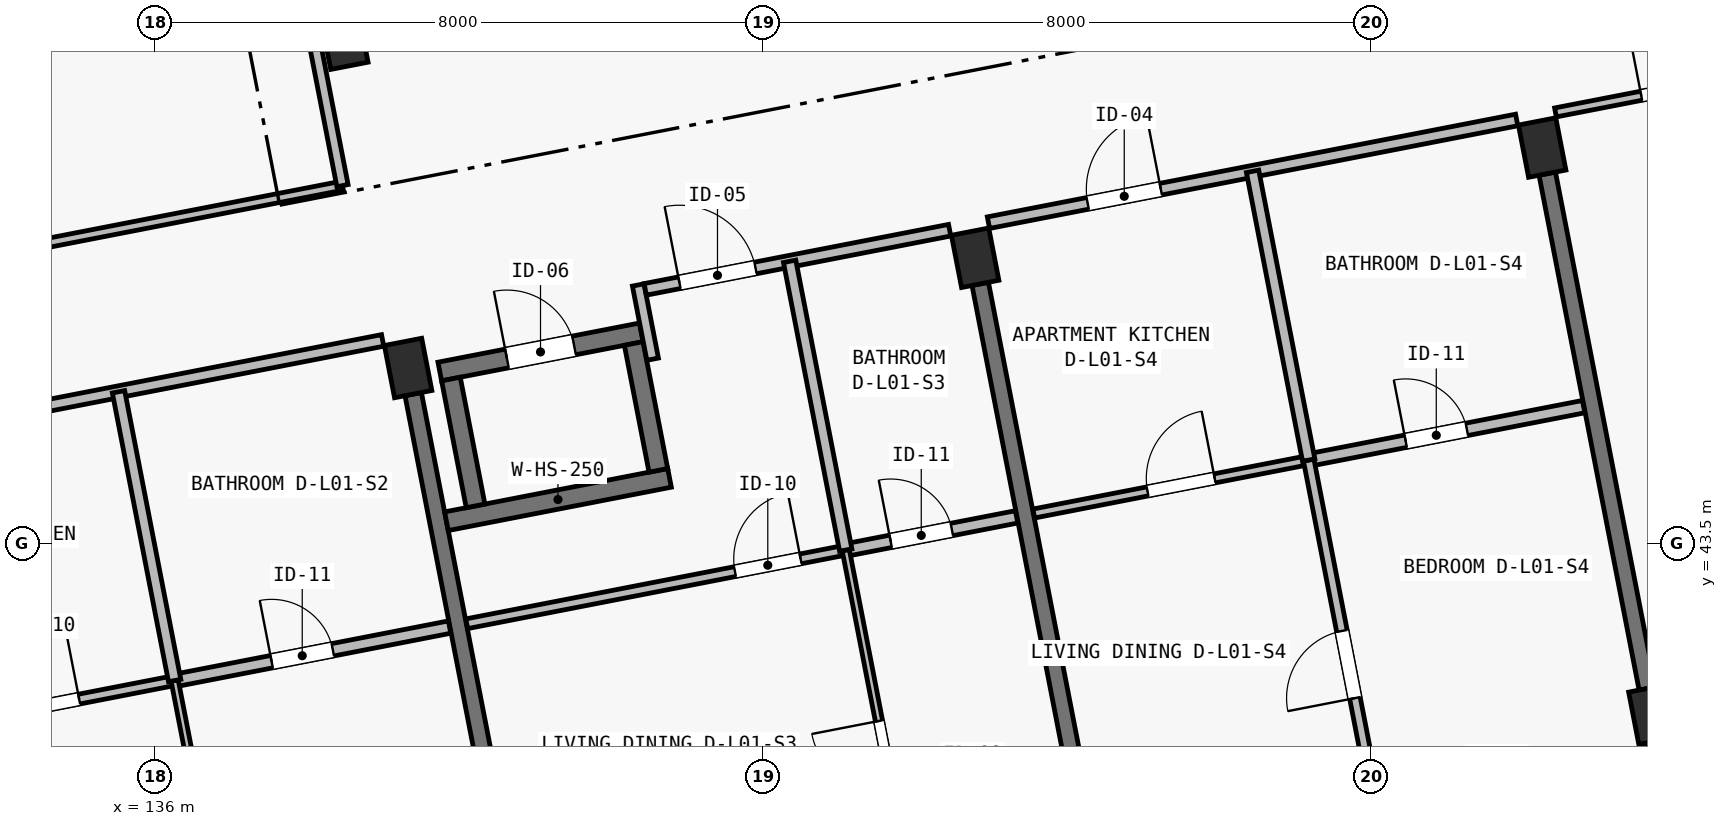
"""IFC4 building model, lengths in metres.
Left out: names, types, materials, properties, quantities, classifications, styles, units other than length and angle.
Written with IfcOpenShell. Run it as: python <this file> out.ifc"""

import sys

from ifc_helpers import new_model, si_unit, direction, frame, frame_2d, origin, origin_2d, place, context, subcontext, project, spatial, rectangle, extrude, element, fill, save


model = new_model("IFC4")
c1 = context("Model", 3, precision=1e-05, world=origin(), true_north=direction((0.0, 1.0)))
c2 = subcontext(c1, "Body", "Model", "MODEL_VIEW")
j1 = project(units=[si_unit("LENGTHUNIT", "METRE"), si_unit("PLANEANGLEUNIT", "RADIAN")], contexts=[c1])
p1 = place(None, origin())
s1 = spatial("IfcSite", under=j1, at=p1, CompositionType="ELEMENT")
p2 = place(p1, origin())
s2 = spatial("IfcBuilding", under=s1, at=p2, CompositionType="ELEMENT")
p3 = place(p2, frame((0.0, 0.0, 4.5)))
s3 = spatial("IfcBuildingStorey", under=s2, at=p3, CompositionType="ELEMENT", Elevation=4.5)
for number, where, z_axis, x_axis in (
    (1, (139.331, 45.811, 0.0), (0.0, 0.0, 1.0), (0.982, 0.191, 0.0)),
    (2, (138.491, 50.13, 0.0), (0.0, 0.0, 1.0), (0.982, 0.191, 0.0)),
    (3, (146.791, 47.261, 0.0), (0.0, 0.0, 1.0), (0.982, 0.191, 0.0)),
    (4, (155.702, 41.251, 0.0), (0.0, 0.0, 1.0), (0.982, 0.191, 0.0)),
    (5, (154.252, 48.711, 0.0), (0.0, 0.0, 1.0), (0.982, 0.191, 0.0)),
):
    element("IfcColumn", number, at=place(p3, frame(where, z_axis=z_axis, x_axis=x_axis)), inside=s3, PredefinedType="COLUMN", context=c2, shape_type="SweptSolid", body=[
        extrude(rectangle(XDim=0.5, YDim=0.7, at=origin_2d()), origin(), (0.0, 0.0, 1.0), 3.9),
    ])
p4 = place(p3, frame((140.714, 38.694, -0.25), z_axis=(0.0, 0.0, 1.0), x_axis=(-0.190819465253, 0.981625148252, 0.0)))
e6 = element("IfcWall", 6, at=p4, inside=s3, PredefinedType="SHEAR", context=c2, shape_type="SweptSolid", body=[
    extrude(rectangle(XDim=6.9, YDim=0.22, at=frame_2d((3.45, 0.0))), origin(), (0.0, 0.0, 1.0), 3.4),
])
p5 = place(p3, frame((148.175, 40.144, -0.25), z_axis=(0.0, 0.0, 1.0), x_axis=(-0.190812837813, 0.981626436546, 0.0)))
e7 = element("IfcWall", 7, at=p5, inside=s3, PredefinedType="SHEAR", context=c2, shape_type="SweptSolid", body=[
    extrude(rectangle(XDim=6.9, YDim=0.22, at=frame_2d((3.45, 0.0))), origin(), (0.0, 0.0, 1.0), 3.4),
])
p6 = place(p3, frame((155.635, 41.594, -0.25), z_axis=(0.0, 0.0, 1.0), x_axis=(-0.190819465253, 0.981625148252, 0.0)))
e8 = element("IfcWall", 8, at=p6, inside=s3, PredefinedType="SHEAR", context=c2, shape_type="SweptSolid", body=[
    extrude(rectangle(XDim=6.9, YDim=0.22, at=frame_2d((3.45, 0.0))), origin(), (0.0, 0.0, 1.0), 3.4),
])
p7 = place(p3, frame((139.835, 43.795, 0.0), z_axis=(0.0, 0.0, 1.0), x_axis=(0.981624737535, 0.190821578075, 0.0)))
e9 = element("IfcWall", 9, at=p7, inside=s3, PredefinedType="SHEAR", context=c2, shape_type="SweptSolid", body=[
    extrude(rectangle(XDim=2.99, YDim=0.25, at=frame_2d((1.495, 0.0))), origin(), (0.0, 0.0, 1.0), 3.9),
])
p8 = place(p3, frame((139.748, 45.764, 0.0), z_axis=(0.0, 0.0, 1.0), x_axis=(0.981630445883, 0.190792210834, 0.0)))
e10 = element("IfcWall", 10, at=p8, inside=s3, PredefinedType="SHEAR", context=c2, shape_type="SweptSolid", body=[
    extrude(rectangle(XDim=2.7, YDim=0.25, at=frame_2d((1.35, 0.0))), origin(), (0.0, 0.0, 1.0), 3.9),
])
p9 = place(p8, frame((0.9, 0.0, 0.0)))
e11 = element("IfcOpeningElement", 11, at=p9, cuts=e10, PredefinedType="OPENING", context=c2, shape_type="SweptSolid", body=[
    extrude(rectangle(XDim=0.9, YDim=2.05, at=frame_2d((0.45, 1.025))), frame((0.0, 0.14, 0.0), z_axis=(0.0, -1.0, 0.0), x_axis=(1.0, 0.0, 0.0)), (0.0, 0.0, 1.0), 0.28),
])
for number, where, z_axis, x_axis in (
    (12, (140.218, 43.997, 0.0), (0.0, 0.0, 1.0), (-0.191, 0.982, 0.0)),
    (13, (142.623, 44.464, 0.0), (0.0, 0.0, 1.0), (-0.191, 0.982, 0.0)),
):
    element("IfcWall", number, at=place(p3, frame(where, z_axis=z_axis, x_axis=x_axis)), inside=s3, PredefinedType="SHEAR", context=c2, shape_type="SweptSolid", body=[
        extrude(rectangle(XDim=1.7, YDim=0.25, at=frame_2d((0.85, 0.0))), origin(), (0.0, 0.0, 1.0), 3.9),
    ])
p10 = place(p3, frame((155.802, 40.735, 0.0), z_axis=(0.0, 0.0, 1.0), x_axis=(-0.981626422232, -0.190812911449, 0.0)))
e14 = element("IfcWall", 14, at=p10, inside=s3, PredefinedType="SOLIDWALL", context=c2, shape_type="SweptSolid", body=[
    extrude(rectangle(XDim=7.6, YDim=0.24, at=frame_2d((3.8, 0.0))), origin(), (0.0, 0.0, 1.0), 3.65),
])
p11 = place(p10, frame((1.847, 0.0, 0.52)))
e15 = element("IfcOpeningElement", 15, at=p11, cuts=e14, PredefinedType="OPENING", context=c2, shape_type="SweptSolid", body=[
    extrude(rectangle(XDim=0.68, YDim=2.24, at=frame_2d((0.34, 1.12))), frame((0.0, 0.135, 0.0), z_axis=(0.0, -1.0, 0.0), x_axis=(1.0, 0.0, 0.0)), (0.0, 0.0, 1.0), 0.27),
])
p12 = place(p10, frame((5.062, 0.0, 0.52)))
e16 = element("IfcOpeningElement", 16, at=p12, cuts=e14, PredefinedType="OPENING", context=c2, shape_type="SweptSolid", body=[
    extrude(rectangle(XDim=0.74, YDim=2.26, at=frame_2d((0.37, 1.13))), frame((0.0, 0.135, 0.0), z_axis=(0.0, -1.0, 0.0), x_axis=(1.0, 0.0, 0.0)), (0.0, 0.0, 1.0), 0.27),
])
p13 = place(p3, frame((132.046, 44.823, 0.0), z_axis=(0.0, 0.0, 1.0), x_axis=(0.9816234647, 0.190828125677, 0.0)))
e17 = element("IfcWall", 17, at=p13, inside=s3, PredefinedType="PARTITIONING", context=c2, shape_type="SweptSolid", body=[
    extrude(rectangle(XDim=7.08, YDim=0.155, at=frame_2d((3.54, 0.0))), origin(), (0.0, 0.0, 1.0), 3.62),
])
p14 = place(p13, frame((1.33, 0.0, 0.0)))
e18 = element("IfcOpeningElement", 18, at=p14, cuts=e17, PredefinedType="OPENING", context=c2, shape_type="SweptSolid", body=[
    extrude(rectangle(XDim=1.02, YDim=2.2, at=frame_2d((0.51, 1.1))), frame((0.0, 0.093, 0.0), z_axis=(0.0, -1.0, 0.0), x_axis=(1.0, 0.0, 0.0)), (0.0, 0.0, 1.0), 0.185),
])
p15 = place(p3, frame((132.642, 40.996, 0.0), z_axis=(0.0, 0.0, 1.0), x_axis=(0.981626422232, 0.190812911449, 0.0)))
e19 = element("IfcWall", 19, at=p15, inside=s3, PredefinedType="PARTITIONING", context=c2, shape_type="SweptSolid", body=[
    extrude(rectangle(XDim=3.685, YDim=0.13, at=frame_2d((1.842, 0.0))), origin(), (0.0, 0.0, 1.0), 3.62),
])
p16 = place(p15, frame((1.525, 0.0, 0.0)))
e20 = element("IfcOpeningElement", 20, at=p16, cuts=e19, PredefinedType="OPENING", context=c2, shape_type="SweptSolid", body=[
    extrude(rectangle(XDim=0.88, YDim=2.1, at=frame_2d((0.44, 1.05))), frame((0.0, 0.08, 0.0), z_axis=(0.0, -1.0, 0.0), x_axis=(1.0, 0.0, 0.0)), (0.0, 0.0, 1.0), 0.16),
])
p17 = place(p3, frame((136.259, 41.699, 0.0), z_axis=(0.0, 0.0, 1.0), x_axis=(0.981628834294, 0.190800502313, 0.0)))
e21 = element("IfcWall", 21, at=p17, inside=s3, PredefinedType="PLUMBINGWALL", context=c2, shape_type="SweptSolid", body=[
    extrude(rectangle(XDim=3.685, YDim=0.165, at=frame_2d((1.843, 0.0))), origin(), (0.0, 0.0, 1.0), 3.62),
])
p18 = place(p17, frame((1.3, 0.0, 0.0)))
e22 = element("IfcOpeningElement", 22, at=p18, cuts=e21, PredefinedType="OPENING", context=c2, shape_type="SweptSolid", body=[
    extrude(rectangle(XDim=0.82, YDim=2.08, at=frame_2d((0.41, 1.04))), frame((0.0, 0.097, 0.0), z_axis=(0.0, -1.0, 0.0), x_axis=(1.0, 0.0, 0.0)), (0.0, 0.0, 1.0), 0.195),
])
p19 = place(p3, frame((137.125, 37.242, 0.0), z_axis=(0.0, 0.0, 1.0), x_axis=(-0.190787619192, 0.981631338316, 0.0)))
e23 = element("IfcWall", 23, at=p19, inside=s3, PredefinedType="PARTITIONING", context=c2, shape_type="SweptSolid", body=[
    extrude(rectangle(XDim=4.54, YDim=0.095, at=frame_2d((2.27, 0.0))), origin(), (0.0, 0.0, 1.0), 3.62),
])
p20 = place(p19, frame((1.35, 0.0, 0.0)))
e24 = element("IfcOpeningElement", 24, at=p20, cuts=e23, PredefinedType="OPENING", context=c2, shape_type="SweptSolid", body=[
    extrude(rectangle(XDim=0.9, YDim=2.1, at=frame_2d((0.45, 1.05))), frame((0.0, 0.062, 0.0), z_axis=(0.0, -1.0, 0.0), x_axis=(1.0, 0.0, 0.0)), (0.0, 0.0, 1.0), 0.125),
])
p21 = place(p3, frame((136.259, 41.699, 0.0), z_axis=(0.0, 0.0, 1.0), x_axis=(-0.190835887914, 0.981621955686, 0.0)))
e25 = element("IfcWall", 25, at=p21, inside=s3, PredefinedType="PLUMBINGWALL", context=c2, shape_type="SweptSolid", body=[
    extrude(rectangle(XDim=3.87, YDim=0.165, at=frame_2d((1.935, 0.0))), origin(), (0.0, 0.0, 1.0), 3.62),
])
p22 = place(p3, frame((142.548, 45.927, 0.0), z_axis=(0.0, 0.0, 1.0), x_axis=(-0.190639805817, 0.981660055436, 0.0)))
e26 = element("IfcWall", 26, at=p22, inside=s3, PredefinedType="PARTITIONING", context=c2, shape_type="SweptSolid", body=[
    extrude(rectangle(XDim=0.995, YDim=0.155, at=frame_2d((0.498, 0.0))), origin(), (0.0, 0.0, 1.0), 3.62),
])
p23 = place(p3, frame((142.451, 46.845, 0.0), z_axis=(0.0, 0.0, 1.0), x_axis=(0.981636249117, 0.190762350636, 0.0)))
e27 = element("IfcWall", 27, at=p23, inside=s3, PredefinedType="PARTITIONING", context=c2, shape_type="SweptSolid", body=[
    extrude(rectangle(XDim=4.08, YDim=0.155, at=frame_2d((2.04, 0.0))), origin(), (0.0, 0.0, 1.0), 3.62),
])
p24 = place(p23, frame((0.458, 0.0, 0.0)))
e28 = element("IfcOpeningElement", 28, at=p24, cuts=e27, PredefinedType="OPENING", context=c2, shape_type="SweptSolid", body=[
    extrude(rectangle(XDim=1.02, YDim=2.2, at=frame_2d((0.51, 1.1))), frame((0.0, 0.093, 0.0), z_axis=(0.0, -1.0, 0.0), x_axis=(1.0, 0.0, 0.0)), (0.0, 0.0, 1.0), 0.185),
])
p25 = place(p3, frame((140.102, 42.446, 0.0), z_axis=(0.0, 0.0, 1.0), x_axis=(0.981621892043, 0.19083621528, 0.0)))
e29 = element("IfcWall", 29, at=p25, inside=s3, PredefinedType="PARTITIONING", context=c2, shape_type="SweptSolid", body=[
    extrude(rectangle(XDim=5.08, YDim=0.13, at=frame_2d((2.54, 0.0))), origin(), (0.0, 0.0, 1.0), 3.62),
])
p26 = place(p25, frame((3.595, 0.0, 0.0)))
e30 = element("IfcOpeningElement", 30, at=p26, cuts=e29, PredefinedType="OPENING", context=c2, shape_type="SweptSolid", body=[
    extrude(rectangle(XDim=0.88, YDim=2.1, at=frame_2d((0.44, 1.05))), frame((0.0, 0.08, 0.0), z_axis=(0.0, -1.0, 0.0), x_axis=(1.0, 0.0, 0.0)), (0.0, 0.0, 1.0), 0.16),
])
p27 = place(p3, frame((145.089, 43.416, 0.0), z_axis=(0.0, 0.0, 1.0), x_axis=(0.981640351498, 0.190741239147, 0.0)))
e31 = element("IfcWall", 31, at=p27, inside=s3, PredefinedType="PLUMBINGWALL", context=c2, shape_type="SweptSolid", body=[
    extrude(rectangle(XDim=2.29, YDim=0.165, at=frame_2d((1.145, 0.0))), origin(), (0.0, 0.0, 1.0), 3.62),
])
p28 = place(p27, frame((0.602, 0.0, 0.0)))
e32 = element("IfcOpeningElement", 32, at=p28, cuts=e31, PredefinedType="OPENING", context=c2, shape_type="SweptSolid", body=[
    extrude(rectangle(XDim=0.82, YDim=2.08, at=frame_2d((0.41, 1.04))), frame((0.0, 0.097, 0.0), z_axis=(0.0, -1.0, 0.0), x_axis=(1.0, 0.0, 0.0)), (0.0, 0.0, 1.0), 0.195),
])
p29 = place(p3, frame((145.955, 38.959, 0.0), z_axis=(0.0, 0.0, 1.0), x_axis=(-0.190797690541, 0.981629380817, 0.0)))
e33 = element("IfcWall", 33, at=p29, inside=s3, PredefinedType="PARTITIONING", context=c2, shape_type="SweptSolid", body=[
    extrude(rectangle(XDim=4.54, YDim=0.095, at=frame_2d((2.27, 0.0))), origin(), (0.0, 0.0, 1.0), 3.62),
])
p30 = place(p29, frame((1.35, 0.0, 0.0)))
e34 = element("IfcOpeningElement", 34, at=p30, cuts=e33, PredefinedType="OPENING", context=c2, shape_type="SweptSolid", body=[
    extrude(rectangle(XDim=0.9, YDim=2.1, at=frame_2d((0.45, 1.05))), frame((0.0, 0.062, 0.0), z_axis=(0.0, -1.0, 0.0), x_axis=(1.0, 0.0, 0.0)), (0.0, 0.0, 1.0), 0.125),
])
p31 = place(p3, frame((145.089, 43.416, 0.0), z_axis=(0.0, 0.0, 1.0), x_axis=(-0.190835887914, 0.981621955686, 0.0)))
e35 = element("IfcWall", 35, at=p31, inside=s3, PredefinedType="PLUMBINGWALL", context=c2, shape_type="SweptSolid", body=[
    extrude(rectangle(XDim=3.87, YDim=0.165, at=frame_2d((1.935, 0.0))), origin(), (0.0, 0.0, 1.0), 3.62),
])
p32 = place(p3, frame((146.966, 47.723, 0.0), z_axis=(0.0, 0.0, 1.0), x_axis=(0.981629923556, 0.190794898199, 0.0)))
e36 = element("IfcWall", 36, at=p32, inside=s3, PredefinedType="PARTITIONING", context=c2, shape_type="SweptSolid", body=[
    extrude(rectangle(XDim=7.08, YDim=0.155, at=frame_2d((3.54, 0.0))), origin(), (0.0, 0.0, 1.0), 3.62),
])
p33 = place(p32, frame((1.33, 0.0, 0.0)))
e37 = element("IfcOpeningElement", 37, at=p33, cuts=e36, PredefinedType="OPENING", context=c2, shape_type="SweptSolid", body=[
    extrude(rectangle(XDim=0.98, YDim=2.15, at=frame_2d((0.49, 1.075))), frame((0.0, 0.093, 0.0), z_axis=(0.0, -1.0, 0.0), x_axis=(1.0, 0.0, 0.0)), (0.0, 0.0, 1.0), 0.185),
])
p34 = place(p3, frame((147.562, 43.896, 0.0), z_axis=(0.0, 0.0, 1.0), x_axis=(0.981626422232, 0.190812911449, 0.0)))
e38 = element("IfcWall", 38, at=p34, inside=s3, PredefinedType="PARTITIONING", context=c2, shape_type="SweptSolid", body=[
    extrude(rectangle(XDim=3.685, YDim=0.12, at=frame_2d((1.842, 0.0))), origin(), (0.0, 0.0, 1.0), 3.62),
])
p35 = place(p34, frame((1.525, 0.0, 0.0)))
e39 = element("IfcOpeningElement", 39, at=p35, cuts=e38, PredefinedType="OPENING", context=c2, shape_type="SweptSolid", body=[
    extrude(rectangle(XDim=0.9, YDim=2.1, at=frame_2d((0.45, 1.05))), frame((0.0, 0.075, 0.0), z_axis=(0.0, -1.0, 0.0), x_axis=(1.0, 0.0, 0.0)), (0.0, 0.0, 1.0), 0.15),
])
p36 = place(p3, frame((151.18, 44.599, 0.0), z_axis=(0.0, 0.0, 1.0), x_axis=(0.981628834294, 0.190800502313, 0.0)))
e40 = element("IfcWall", 40, at=p36, inside=s3, PredefinedType="PLUMBINGWALL", context=c2, shape_type="SweptSolid", body=[
    extrude(rectangle(XDim=3.685, YDim=0.165, at=frame_2d((1.843, 0.0))), origin(), (0.0, 0.0, 1.0), 3.62),
])
p37 = place(p36, frame((1.3, 0.0, 0.0)))
e41 = element("IfcOpeningElement", 41, at=p37, cuts=e40, PredefinedType="OPENING", context=c2, shape_type="SweptSolid", body=[
    extrude(rectangle(XDim=0.82, YDim=2.08, at=frame_2d((0.41, 1.04))), frame((0.0, 0.097, 0.0), z_axis=(0.0, -1.0, 0.0), x_axis=(1.0, 0.0, 0.0)), (0.0, 0.0, 1.0), 0.195),
])
p38 = place(p3, frame((152.046, 40.143, 0.0), z_axis=(0.0, 0.0, 1.0), x_axis=(-0.190849508215, 0.981619307682, 0.0)))
e42 = element("IfcWall", 42, at=p38, inside=s3, PredefinedType="PARTITIONING", context=c2, shape_type="SweptSolid", body=[
    extrude(rectangle(XDim=4.54, YDim=0.14, at=frame_2d((2.27, 0.0))), origin(), (0.0, 0.0, 1.0), 3.62),
])
p39 = place(p38, frame((1.35, 0.0, 0.0)))
e43 = element("IfcOpeningElement", 43, at=p39, cuts=e42, PredefinedType="OPENING", context=c2, shape_type="SweptSolid", body=[
    extrude(rectangle(XDim=0.9, YDim=2.1, at=frame_2d((0.45, 1.05))), frame((0.0, 0.085, 0.0), z_axis=(0.0, -1.0, 0.0), x_axis=(1.0, 0.0, 0.0)), (0.0, 0.0, 1.0), 0.17),
])
p40 = place(p3, frame((151.18, 44.599, 0.0), z_axis=(0.0, 0.0, 1.0), x_axis=(-0.190763284403, 0.981636067656, 0.0)))
e44 = element("IfcWall", 44, at=p40, inside=s3, PredefinedType="PLUMBINGWALL", context=c2, shape_type="SweptSolid", body=[
    extrude(rectangle(XDim=3.87, YDim=0.165, at=frame_2d((1.935, 0.0))), origin(), (0.0, 0.0, 1.0), 3.62),
])
p41 = place(p3, frame((154.427, 49.173, 0.0), z_axis=(0.0, 0.0, 1.0), x_axis=(0.981628202514, 0.190803752658, 0.0)))
e45 = element("IfcWall", 45, at=p41, inside=s3, PredefinedType="PARTITIONING", context=c2, shape_type="SweptSolid", body=[
    extrude(rectangle(XDim=4.66, YDim=0.12, at=frame_2d((2.33, 0.0))), origin(), (0.0, 0.0, 1.0), 3.62),
])
p42 = place(p41, frame((1.15, 0.0, 0.0)))
e46 = element("IfcOpeningElement", 46, at=p42, cuts=e45, PredefinedType="OPENING", context=c2, shape_type="SweptSolid", body=[
    extrude(rectangle(XDim=1.15, YDim=2.15, at=frame_2d((0.575, 1.075))), frame((0.0, 0.075, 0.0), z_axis=(0.0, -1.0, 0.0), x_axis=(1.0, 0.0, 0.0)), (0.0, 0.0, 1.0), 0.15),
])
p43 = place(p3, frame((131.772, 46.909, 0.0), z_axis=(0.0, 0.0, 1.0), x_axis=(0.981622468528, 0.190833249935, 0.0)))
e47 = element("IfcWall", 47, at=p43, inside=s3, PredefinedType="PARTITIONING", context=c2, shape_type="SweptSolid", body=[
    extrude(rectangle(XDim=6.82, YDim=0.12, at=frame_2d((3.41, 0.0))), origin(), (0.0, 0.0, 1.0), 3.62),
])
p44 = place(p43, frame((1.6, 0.0, 0.0)))
e48 = element("IfcOpeningElement", 48, at=p44, cuts=e47, PredefinedType="OPENING", context=c2, shape_type="SweptSolid", body=[
    extrude(rectangle(XDim=1.15, YDim=2.15, at=frame_2d((0.575, 1.075))), frame((0.0, 0.075, 0.0), z_axis=(0.0, -1.0, 0.0), x_axis=(1.0, 0.0, 0.0)), (0.0, 0.0, 1.0), 0.15),
])
p45 = place(p3, frame((138.467, 48.21, 0.0), z_axis=(0.0, 0.0, 1.0), x_axis=(-0.190814044018, 0.981626202078, 0.0)))
e49 = element("IfcWall", 49, at=p45, inside=s3, PredefinedType="PARTITIONING", context=c2, shape_type="SweptSolid", body=[
    extrude(rectangle(XDim=9.87, YDim=0.15, at=frame_2d((4.935, 0.0))), origin(), (0.0, 0.0, 1.0), 3.62),
])
p46 = place(p16, origin())
e50 = element("IfcDoor", 50, at=p46, inside=s3, OperationType="SINGLE_SWING_RIGHT", PredefinedType="DOOR", context=c2, shape_type="SweptSolid", body=[
    extrude(rectangle(XDim=0.88, YDim=2.1, at=frame_2d((0.44, 1.05))), frame((0.0, 0.025, 0.0), z_axis=(0.0, -1.0, 0.0), x_axis=(1.0, 0.0, 0.0)), (0.0, 0.0, 1.0), 0.05),
])
fill(e20, e50)
p47 = place(p18, origin())
e51 = element("IfcDoor", 51, at=p47, inside=s3, OperationType="SINGLE_SWING_LEFT", PredefinedType="DOOR", context=c2, shape_type="SweptSolid", body=[
    extrude(rectangle(XDim=0.82, YDim=2.08, at=frame_2d((0.41, 1.04))), frame((0.0, 0.025, 0.0), z_axis=(0.0, -1.0, 0.0), x_axis=(1.0, 0.0, 0.0)), (0.0, 0.0, 1.0), 0.05),
])
fill(e22, e51)
p48 = place(p24, origin())
e52 = element("IfcDoor", 52, at=p48, inside=s3, OperationType="SINGLE_SWING_LEFT", PredefinedType="DOOR", context=c2, shape_type="SweptSolid", body=[
    extrude(rectangle(XDim=1.02, YDim=2.2, at=frame_2d((0.51, 1.1))), frame((0.0, 0.025, 0.0), z_axis=(0.0, -1.0, 0.0), x_axis=(1.0, 0.0, 0.0)), (0.0, 0.0, 1.0), 0.05),
])
fill(e28, e52)
p49 = place(p26, origin())
e53 = element("IfcDoor", 53, at=p49, inside=s3, OperationType="SINGLE_SWING_RIGHT", PredefinedType="DOOR", context=c2, shape_type="SweptSolid", body=[
    extrude(rectangle(XDim=0.88, YDim=2.1, at=frame_2d((0.44, 1.05))), frame((0.0, 0.025, 0.0), z_axis=(0.0, -1.0, 0.0), x_axis=(1.0, 0.0, 0.0)), (0.0, 0.0, 1.0), 0.05),
])
fill(e30, e53)
p50 = place(p28, origin())
e54 = element("IfcDoor", 54, at=p50, inside=s3, OperationType="SINGLE_SWING_LEFT", PredefinedType="DOOR", context=c2, shape_type="SweptSolid", body=[
    extrude(rectangle(XDim=0.82, YDim=2.08, at=frame_2d((0.41, 1.04))), frame((0.0, 0.025, 0.0), z_axis=(0.0, -1.0, 0.0), x_axis=(1.0, 0.0, 0.0)), (0.0, 0.0, 1.0), 0.05),
])
fill(e32, e54)
p51 = place(p30, origin())
e55 = element("IfcDoor", 55, at=p51, inside=s3, OperationType="SINGLE_SWING_RIGHT", PredefinedType="DOOR", context=c2, shape_type="SweptSolid", body=[
    extrude(rectangle(XDim=0.9, YDim=2.1, at=frame_2d((0.45, 1.05))), frame((0.0, 0.025, 0.0), z_axis=(0.0, -1.0, 0.0), x_axis=(1.0, 0.0, 0.0)), (0.0, 0.0, 1.0), 0.05),
])
fill(e34, e55)
p52 = place(p33, origin())
e56 = element("IfcDoor", 56, at=p52, inside=s3, OperationType="SINGLE_SWING_RIGHT", PredefinedType="DOOR", context=c2, shape_type="SweptSolid", body=[
    extrude(rectangle(XDim=0.98, YDim=2.15, at=frame_2d((0.49, 1.075))), frame((0.0, 0.025, 0.0), z_axis=(0.0, -1.0, 0.0), x_axis=(1.0, 0.0, 0.0)), (0.0, 0.0, 1.0), 0.05),
])
fill(e37, e56)
p53 = place(p35, origin())
e57 = element("IfcDoor", 57, at=p53, inside=s3, OperationType="SINGLE_SWING_RIGHT", PredefinedType="DOOR", context=c2, shape_type="SweptSolid", body=[
    extrude(rectangle(XDim=0.9, YDim=2.1, at=frame_2d((0.45, 1.05))), frame((0.0, 0.025, 0.0), z_axis=(0.0, -1.0, 0.0), x_axis=(1.0, 0.0, 0.0)), (0.0, 0.0, 1.0), 0.05),
])
fill(e39, e57)
p54 = place(p37, origin())
e58 = element("IfcDoor", 58, at=p54, inside=s3, OperationType="SINGLE_SWING_LEFT", PredefinedType="DOOR", context=c2, shape_type="SweptSolid", body=[
    extrude(rectangle(XDim=0.82, YDim=2.08, at=frame_2d((0.41, 1.04))), frame((0.0, 0.025, 0.0), z_axis=(0.0, -1.0, 0.0), x_axis=(1.0, 0.0, 0.0)), (0.0, 0.0, 1.0), 0.05),
])
fill(e41, e58)
p55 = place(p39, origin())
e59 = element("IfcDoor", 59, at=p55, inside=s3, OperationType="SINGLE_SWING_LEFT", PredefinedType="DOOR", context=c2, shape_type="SweptSolid", body=[
    extrude(rectangle(XDim=0.9, YDim=2.1, at=frame_2d((0.45, 1.05))), frame((0.0, 0.025, 0.0), z_axis=(0.0, -1.0, 0.0), x_axis=(1.0, 0.0, 0.0)), (0.0, 0.0, 1.0), 0.05),
])
fill(e43, e59)
p56 = place(p42, origin())
e60 = element("IfcDoor", 60, at=p56, inside=s3, OperationType="SINGLE_SWING_LEFT", PredefinedType="DOOR", context=c2, shape_type="SweptSolid", body=[
    extrude(rectangle(XDim=1.15, YDim=2.15, at=frame_2d((0.575, 1.075))), frame((0.0, 0.025, 0.0), z_axis=(0.0, -1.0, 0.0), x_axis=(1.0, 0.0, 0.0)), (0.0, 0.0, 1.0), 0.05),
])
fill(e46, e60)
p57 = place(p9, origin())
e61 = element("IfcDoor", 61, at=p57, inside=s3, OperationType="SINGLE_SWING_LEFT", PredefinedType="DOOR", context=c2, shape_type="SweptSolid", body=[
    extrude(rectangle(XDim=0.9, YDim=2.05, at=frame_2d((0.45, 1.025))), frame((0.0, 0.025, 0.0), z_axis=(0.0, -1.0, 0.0), x_axis=(1.0, 0.0, 0.0)), (0.0, 0.0, 1.0), 0.05),
])
fill(e11, e61)
save(model, sys.argv[1])
